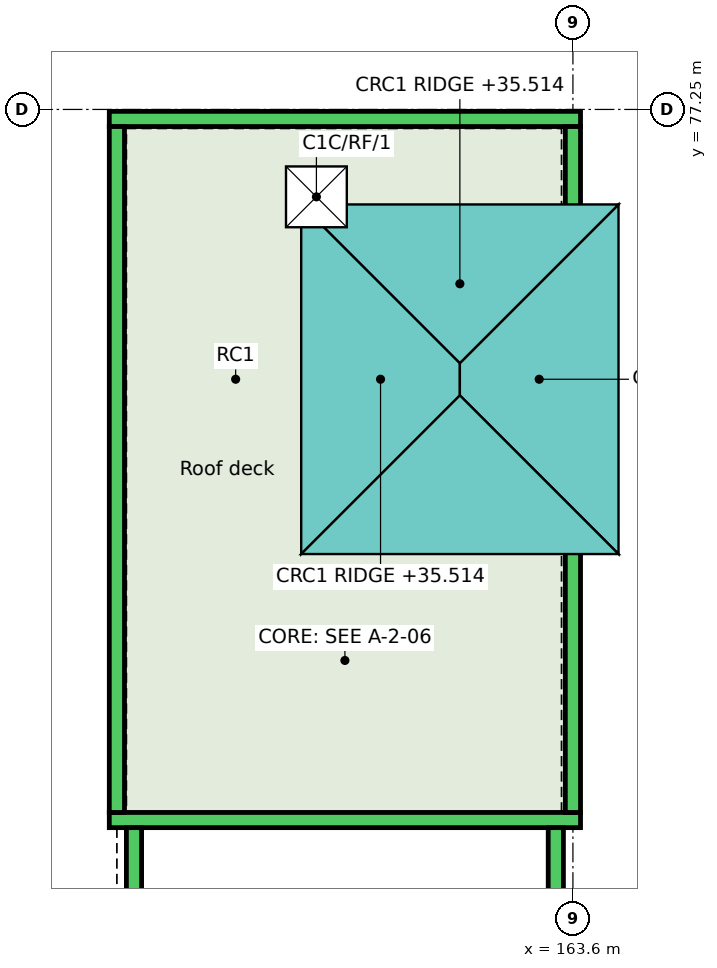
"""IFC4 building model, lengths in metres.
Left out: names, types, materials, properties, quantities, classifications, styles, units other than length and angle.
Written with IfcOpenShell. Run it as: python <this file> out.ifc"""

import sys

from ifc_helpers import new_model, si_unit, direction, frame, frame_2d, origin, origin_2d, place, context, subcontext, project, spatial, rectangle, extrude, element, save


model = new_model("IFC4")
c1 = context("Model", 3, precision=1e-05, world=origin(), true_north=direction((0.0, 1.0)))
c2 = subcontext(c1, "Body", "Model", "MODEL_VIEW")
j1 = project(units=[si_unit("LENGTHUNIT", "METRE"), si_unit("PLANEANGLEUNIT", "RADIAN")], contexts=[c1])
p1 = place(None, origin())
s1 = spatial("IfcSite", under=j1, at=p1, CompositionType="ELEMENT")
p2 = place(p1, origin())
s2 = spatial("IfcBuilding", under=s1, at=p2, CompositionType="ELEMENT")
p3 = place(p2, frame((0.0, 0.0, 33.0)))
s3 = spatial("IfcBuildingStorey", under=s2, at=p3, CompositionType="ELEMENT", Elevation=33.0)
for number, where, z_axis, x_axis in (
    (1, (160.625, 72.1, 0.0), (0.0, 0.0, 1.0), (1.0, 0.0, 0.0)),
    (2, (160.625, 75.3, 0.0), (0.0, 0.0, 1.0), (1.0, 0.0, 0.0)),
):
    element("IfcWall", number, at=place(p3, frame(where, z_axis=z_axis, x_axis=x_axis)), inside=s3, PredefinedType="SHEAR", context=c2, shape_type="SweptSolid", body=[
        extrude(rectangle(XDim=2.975, YDim=0.2, at=frame_2d((1.488, 0.0))), origin(), (0.0, 0.0, 1.0), 1.5),
    ])
p4 = place(p3, frame((160.725, 72.2, 0.0), z_axis=(0.0, 0.0, 1.0), x_axis=(0.0, 1.0, 0.0)))
e3 = element("IfcWall", 3, at=p4, inside=s3, PredefinedType="SHEAR", context=c2, shape_type="SweptSolid", body=[
    extrude(rectangle(XDim=3.0, YDim=0.2, at=frame_2d((1.5, 0.0))), origin(), (0.0, 0.0, 1.0), 1.5),
])
p5 = place(p3, frame((163.525, 72.2, 0.0), z_axis=(0.0, 0.0, 1.0), x_axis=(0.0, 1.0, 0.0)))
e4 = element("IfcWall", 4, at=p5, inside=s3, PredefinedType="SHEAR", context=c2, shape_type="SweptSolid", body=[
    extrude(rectangle(XDim=3.0, YDim=0.15, at=frame_2d((1.5, 0.0))), origin(), (0.0, 0.0, 1.0), 1.5),
])
for number, where, z_axis, x_axis in (
    (5, (157.5, 77.125, 0.0), (0.0, 0.0, 1.0), (1.0, 0.0, 0.0)),
    (6, (157.5, 67.9, 0.0), (0.0, 0.0, 1.0), (1.0, 0.0, 0.0)),
):
    element("IfcWall", number, at=place(p3, frame(where, z_axis=z_axis, x_axis=x_axis)), inside=s3, PredefinedType="PARAPET", context=c2, shape_type="SweptSolid", body=[
        extrude(rectangle(XDim=6.2, YDim=0.2, at=frame_2d((3.1, 0.0))), origin(), (0.0, 0.0, 1.0), 1.1),
    ])
p6 = place(p3, frame((157.6, 68.0, 0.0), z_axis=(0.0, 0.0, 1.0), x_axis=(0.0, 1.0, 0.0)))
e7 = element("IfcWall", 7, at=p6, inside=s3, PredefinedType="PARAPET", context=c2, shape_type="SweptSolid", body=[
    extrude(rectangle(XDim=9.025, YDim=0.2, at=frame_2d((4.512, 0.0))), origin(), (0.0, 0.0, 1.0), 1.1),
])
p7 = place(p3, frame((163.6, 68.0, 0.0), z_axis=(0.0, 0.0, 1.0), x_axis=(0.0, 1.0, 0.0)))
e8 = element("IfcWall", 8, at=p7, inside=s3, PredefinedType="PARAPET", context=c2, shape_type="SweptSolid", body=[
    extrude(rectangle(XDim=4.0, YDim=0.2, at=frame_2d((2.0, 0.0))), origin(), (0.0, 0.0, 1.0), 1.1),
])
p8 = place(p3, frame((163.6, 75.4, 0.0), z_axis=(0.0, 0.0, 1.0), x_axis=(0.0, 1.0, 0.0)))
e9 = element("IfcWall", 9, at=p8, inside=s3, PredefinedType="PARAPET", context=c2, shape_type="SweptSolid", body=[
    extrude(rectangle(XDim=1.625, YDim=0.2, at=frame_2d((0.812, 0.0))), origin(), (0.0, 0.0, 1.0), 1.1),
])
for number, where, z_axis, x_axis in (
    (10, (157.825, 66.225, 0.0), (0.0, 0.0, 1.0), (0.0, 1.0, 0.0)),
    (11, (163.375, 66.225, 0.0), (0.0, 0.0, 1.0), (0.0, 1.0, 0.0)),
):
    element("IfcWall", number, at=place(p3, frame(where, z_axis=z_axis, x_axis=x_axis)), inside=s3, PredefinedType="PARAPET", context=c2, shape_type="SweptSolid", body=[
        extrude(rectangle(XDim=1.575, YDim=0.2, at=frame_2d((0.788, 0.0))), origin(), (0.0, 0.0, 1.0), 1.1),
    ])
p9 = place(p3, frame((0.0, 0.0, -0.25)))
p10 = place(p9, frame((160.225, 76.1, 0.0)))
p11 = place(p10, frame((0.0, 0.0, 0.2)))
e12 = element("IfcDoor", 12, at=p11, inside=s3, OperationType="SINGLE_SWING_LEFT", PredefinedType="TRAPDOOR", context=c2, shape_type="SweptSolid", body=[
    extrude(rectangle(XDim=0.8, YDim=0.8, at=origin_2d()), origin(), (0.0, 0.0, 1.0), 0.05),
])
save(model, sys.argv[1])
